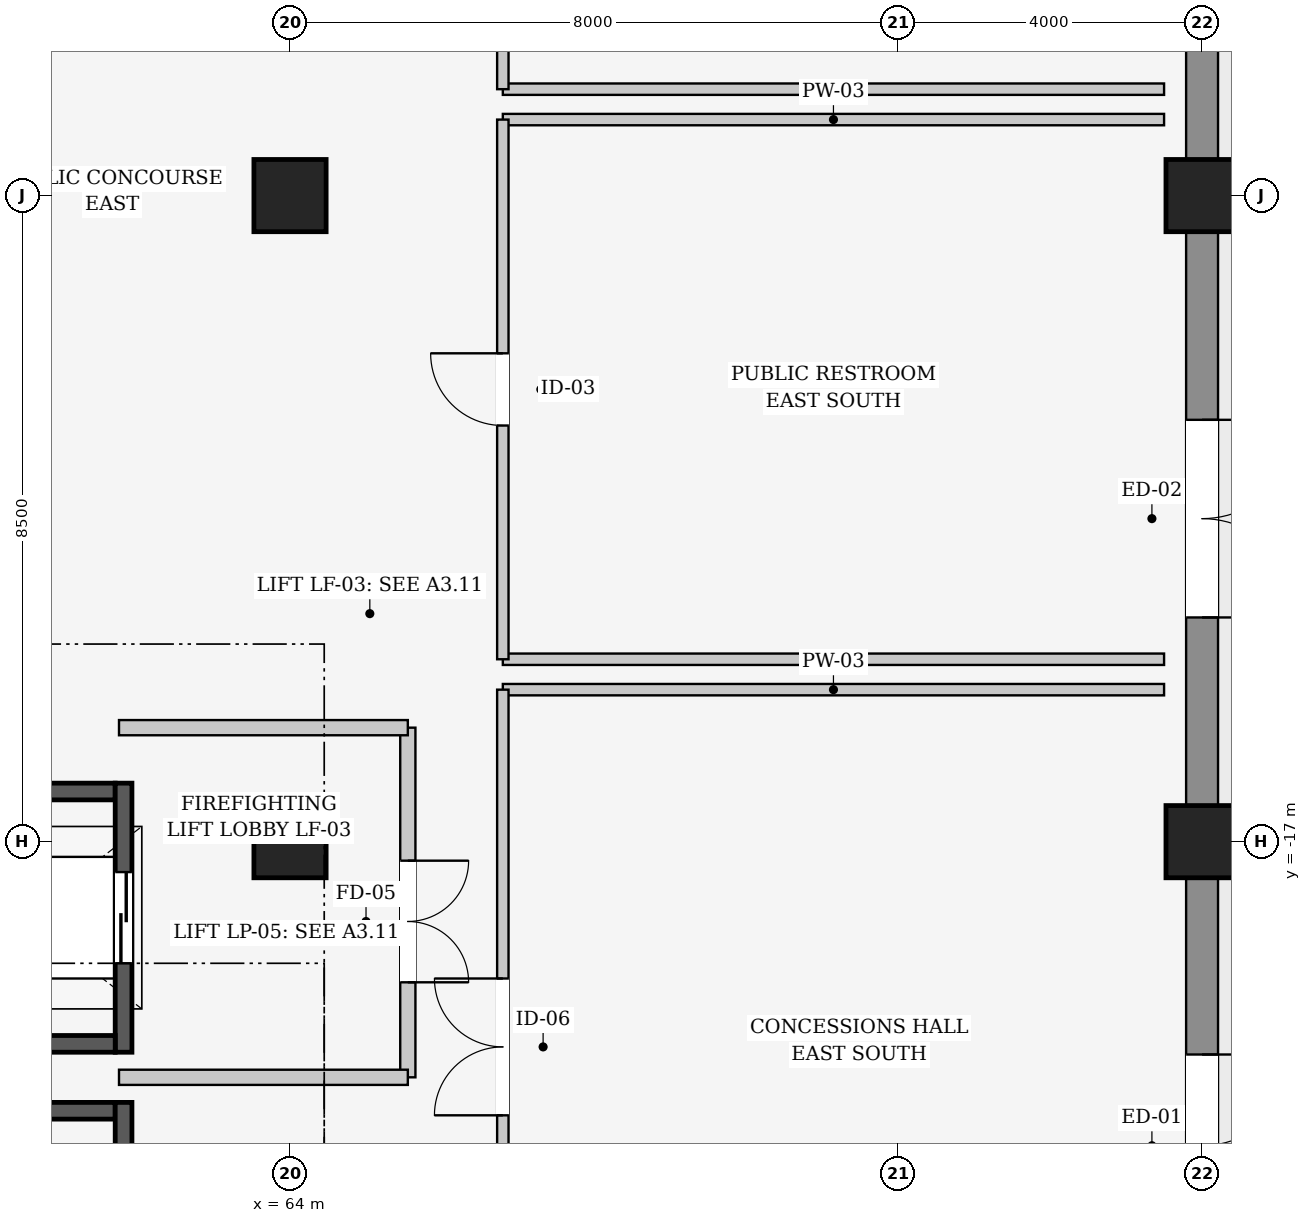
"""IFC4 building model, lengths in metres.
Left out: names, types, materials, properties, quantities, classifications, styles, units other than length and angle.
Written with IfcOpenShell. Run it as: python <this file> out.ifc"""

import sys

from ifc_helpers import new_model, si_unit, direction, frame, frame_2d, origin, origin_2d, place, context, subcontext, project, spatial, rectangle, extrude, element, fill, save


model = new_model("IFC4")
c1 = context("Model", 3, precision=1e-05, world=origin(), true_north=direction((0.0, 1.0)))
c2 = subcontext(c1, "Body", "Model", "MODEL_VIEW")
j1 = project(units=[si_unit("LENGTHUNIT", "METRE"), si_unit("PLANEANGLEUNIT", "RADIAN")], contexts=[c1])
p1 = place(None, origin())
s1 = spatial("IfcSite", under=j1, at=p1, CompositionType="ELEMENT")
p2 = place(p1, origin())
s2 = spatial("IfcBuilding", under=s1, at=p2, CompositionType="ELEMENT")
p3 = place(p2, origin())
s3 = spatial("IfcBuildingStorey", under=s2, at=p3, CompositionType="ELEMENT", Elevation=0.0)
for number, where, z_axis, x_axis in (
    (1, (64.0, -17.0, 0.0), (0.0, 0.0, 1.0), (1.0, 0.0, 0.0)),
    (2, (64.0, -8.5, 0.0), (0.0, 0.0, 1.0), (1.0, 0.0, 0.0)),
    (3, (76.0, -17.0, 0.0), (0.0, 0.0, 1.0), (1.0, 0.0, 0.0)),
    (4, (76.0, -8.5, 0.0), (0.0, 0.0, 1.0), (1.0, 0.0, 0.0)),
):
    element("IfcColumn", number, at=place(p3, frame(where, z_axis=z_axis, x_axis=x_axis)), inside=s3, PredefinedType="COLUMN", context=c2, shape_type="SweptSolid", body=[
        extrude(rectangle(XDim=0.95, YDim=0.95, at=origin_2d()), origin(), (0.0, 0.0, 1.0), 6.0),
    ])
p4 = place(p3, frame((76.0, -17.457, 0.0), z_axis=(0.0, 0.0, 1.0), x_axis=(0.0, -1.0, 0.0)))
e5 = element("IfcWall", 5, at=p4, inside=s3, PredefinedType="SOLIDWALL", context=c2, shape_type="SweptSolid", body=[
    extrude(rectangle(XDim=7.086, YDim=0.42, at=frame_2d((3.543, 0.0))), origin(), (0.0, 0.0, 1.0), 4.74),
])
p5 = place(p4, frame((2.343, 0.0, 0.0)))
e6 = element("IfcOpeningElement", 6, at=p5, cuts=e5, PredefinedType="OPENING", context=c2, shape_type="SweptSolid", body=[
    extrude(rectangle(XDim=2.4, YDim=3.0, at=frame_2d((1.2, 1.5))), frame((0.0, 0.22, 0.0), z_axis=(0.0, -1.0, 0.0), x_axis=(1.0, 0.0, 0.0)), (0.0, 0.0, 1.0), 0.44),
])
p6 = place(p3, frame((76.0, -8.957, 0.0), z_axis=(0.0, 0.0, 1.0), x_axis=(0.0, -1.0, 0.0)))
e7 = element("IfcWall", 7, at=p6, inside=s3, PredefinedType="SOLIDWALL", context=c2, shape_type="SweptSolid", body=[
    extrude(rectangle(XDim=7.586, YDim=0.42, at=frame_2d((3.793, 0.0))), origin(), (0.0, 0.0, 1.0), 4.74),
])
p7 = place(p6, frame((2.493, 0.0, 0.0)))
e8 = element("IfcOpeningElement", 8, at=p7, cuts=e7, PredefinedType="OPENING", context=c2, shape_type="SweptSolid", body=[
    extrude(rectangle(XDim=2.6, YDim=3.0, at=frame_2d((1.3, 1.5))), frame((0.0, 0.22, 0.0), z_axis=(0.0, -1.0, 0.0), x_axis=(1.0, 0.0, 0.0)), (0.0, 0.0, 1.0), 0.44),
])
p8 = place(p3, frame((76.0, -0.457, 0.0), z_axis=(0.0, 0.0, 1.0), x_axis=(0.0, -1.0, 0.0)))
e9 = element("IfcWall", 9, at=p8, inside=s3, PredefinedType="SOLIDWALL", context=c2, shape_type="SweptSolid", body=[
    extrude(rectangle(XDim=7.586, YDim=0.42, at=frame_2d((3.793, 0.0))), origin(), (0.0, 0.0, 1.0), 4.74),
])
p9 = place(p8, frame((2.393, 0.0, 0.0)))
e10 = element("IfcOpeningElement", 10, at=p9, cuts=e9, PredefinedType="OPENING", context=c2, shape_type="SweptSolid", body=[
    extrude(rectangle(XDim=2.8, YDim=3.2, at=frame_2d((1.4, 1.6))), frame((0.0, 0.22, 0.0), z_axis=(0.0, -1.0, 0.0), x_axis=(1.0, 0.0, 0.0)), (0.0, 0.0, 1.0), 0.44),
])
p10 = place(p3, frame((59.3, -16.34, 0.0), z_axis=(0.0, 0.0, 1.0), x_axis=(1.0, 0.0, 0.0)))
e11 = element("IfcWall", 11, at=p10, inside=s3, PredefinedType="SHEAR", context=c2, shape_type="SweptSolid", body=[
    extrude(rectangle(XDim=2.4, YDim=0.22, at=frame_2d((1.2, 0.0))), origin(), (0.0, 0.0, 1.0), 6.0),
])
p11 = place(p3, frame((61.81, -16.23, 0.0), z_axis=(0.0, 0.0, 1.0), x_axis=(0.0, -1.0, 0.0)))
e12 = element("IfcWall", 12, at=p11, inside=s3, PredefinedType="SHEAR", context=c2, shape_type="SweptSolid", body=[
    extrude(rectangle(XDim=3.54, YDim=0.22, at=frame_2d((1.77, 0.0))), origin(), (0.0, 0.0, 1.0), 6.0),
])
p12 = place(p11, frame((1.17, 0.0, 0.0)))
e13 = element("IfcOpeningElement", 13, at=p12, cuts=e12, PredefinedType="OPENING", context=c2, shape_type="SweptSolid", body=[
    extrude(rectangle(XDim=1.2, YDim=2.2, at=frame_2d((0.6, 1.1))), frame((0.0, 0.12, 0.0), z_axis=(0.0, -1.0, 0.0), x_axis=(1.0, 0.0, 0.0)), (0.0, 0.0, 1.0), 0.24),
])
for number, where, z_axis, x_axis in (
    (14, (61.7, -19.66, 0.0), (0.0, 0.0, 1.0), (-1.0, 0.0, 0.0)),
    (15, (59.3, -20.54, 0.0), (0.0, 0.0, 1.0), (1.0, 0.0, 0.0)),
):
    element("IfcWall", number, at=place(p3, frame(where, z_axis=z_axis, x_axis=x_axis)), inside=s3, PredefinedType="SHEAR", context=c2, shape_type="SweptSolid", body=[
        extrude(rectangle(XDim=2.4, YDim=0.22, at=frame_2d((1.2, 0.0))), origin(), (0.0, 0.0, 1.0), 6.0),
    ])
p13 = place(p3, frame((61.81, -20.43, 0.0), z_axis=(0.0, 0.0, 1.0), x_axis=(0.0, -1.0, 0.0)))
e16 = element("IfcWall", 16, at=p13, inside=s3, PredefinedType="SHEAR", context=c2, shape_type="SweptSolid", body=[
    extrude(rectangle(XDim=3.54, YDim=0.22, at=frame_2d((1.77, 0.0))), origin(), (0.0, 0.0, 1.0), 6.0),
])
p14 = place(p13, frame((1.22, 0.0, 0.0)))
e17 = element("IfcOpeningElement", 17, at=p14, cuts=e16, PredefinedType="OPENING", context=c2, shape_type="SweptSolid", body=[
    extrude(rectangle(XDim=1.1, YDim=2.2, at=frame_2d((0.55, 1.1))), frame((0.0, 0.12, 0.0), z_axis=(0.0, -1.0, 0.0), x_axis=(1.0, 0.0, 0.0)), (0.0, 0.0, 1.0), 0.24),
])
p15 = place(p3, frame((65.55, -15.5, 0.0), z_axis=(0.0, 0.0, 1.0), x_axis=(0.0, -1.0, 0.0)))
e18 = element("IfcWall", 18, at=p15, inside=s3, PredefinedType="PARTITIONING", context=c2, shape_type="SweptSolid", body=[
    extrude(rectangle(XDim=4.6, YDim=0.2, at=frame_2d((2.3, 0.0))), origin(), (0.0, 0.0, 1.0), 4.725),
])
p16 = place(p15, frame((1.75, 0.0, 0.0)))
e19 = element("IfcOpeningElement", 19, at=p16, cuts=e18, PredefinedType="OPENING", context=c2, shape_type="SweptSolid", body=[
    extrude(rectangle(XDim=1.6, YDim=2.2, at=frame_2d((0.8, 1.1))), frame((0.0, 0.11, 0.0), z_axis=(0.0, -1.0, 0.0), x_axis=(1.0, 0.0, 0.0)), (0.0, 0.0, 1.0), 0.22),
])
for number, where, z_axis, x_axis in (
    (20, (61.75, -15.5, 0.0), (0.0, 0.0, 1.0), (1.0, 0.0, 0.0)),
    (21, (65.55, -20.1, 0.0), (0.0, 0.0, 1.0), (-1.0, 0.0, 0.0)),
):
    element("IfcWall", number, at=place(p3, frame(where, z_axis=z_axis, x_axis=x_axis)), inside=s3, PredefinedType="PARTITIONING", context=c2, shape_type="SweptSolid", body=[
        extrude(rectangle(XDim=3.8, YDim=0.2, at=frame_2d((1.9, 0.0))), origin(), (0.0, 0.0, 1.0), 5.025),
    ])
p17 = place(p3, frame((66.8, -15.0, 0.0), z_axis=(0.0, 0.0, 1.0), x_axis=(1.0, 0.0, 0.0)))
e22 = element("IfcWall", 22, at=p17, inside=s3, PredefinedType="PARTITIONING", context=c2, shape_type="SweptSolid", body=[
    extrude(rectangle(XDim=8.7, YDim=0.15, at=frame_2d((4.35, 0.0))), origin(), (0.0, 0.0, 1.0), 5.64),
])
p18 = place(p3, frame((66.8, -24.4, 0.0), z_axis=(0.0, 0.0, 1.0), x_axis=(0.0, 1.0, 0.0)))
e23 = element("IfcWall", 23, at=p18, inside=s3, PredefinedType="PARTITIONING", context=c2, shape_type="SweptSolid", body=[
    extrude(rectangle(XDim=9.4, YDim=0.15, at=frame_2d((4.7, 0.0))), origin(), (0.0, 0.0, 1.0), 4.725),
])
p19 = place(p18, frame((3.8, 0.0, 0.0)))
e24 = element("IfcOpeningElement", 24, at=p19, cuts=e23, PredefinedType="OPENING", context=c2, shape_type="SweptSolid", body=[
    extrude(rectangle(XDim=1.8, YDim=2.2, at=frame_2d((0.9, 1.1))), frame((0.0, 0.085, 0.0), z_axis=(0.0, -1.0, 0.0), x_axis=(1.0, 0.0, 0.0)), (0.0, 0.0, 1.0), 0.17),
])
for number, where, z_axis, x_axis in (
    (25, (66.8, -7.5, 0.0), (0.0, 0.0, 1.0), (1.0, 0.0, 0.0)),
    (26, (75.5, -14.6, 0.0), (0.0, 0.0, 1.0), (-1.0, 0.0, 0.0)),
):
    element("IfcWall", number, at=place(p3, frame(where, z_axis=z_axis, x_axis=x_axis)), inside=s3, PredefinedType="PARTITIONING", context=c2, shape_type="SweptSolid", body=[
        extrude(rectangle(XDim=8.7, YDim=0.15, at=frame_2d((4.35, 0.0))), origin(), (0.0, 0.0, 1.0), 5.64),
    ])
p20 = place(p3, frame((66.8, -14.6, 0.0), z_axis=(0.0, 0.0, 1.0), x_axis=(0.0, 1.0, 0.0)))
e27 = element("IfcWall", 27, at=p20, inside=s3, PredefinedType="PARTITIONING", context=c2, shape_type="SweptSolid", body=[
    extrude(rectangle(XDim=7.1, YDim=0.15, at=frame_2d((3.55, 0.0))), origin(), (0.0, 0.0, 1.0), 4.725),
])
p21 = place(p20, frame((3.075, 0.0, 0.0)))
e28 = element("IfcOpeningElement", 28, at=p21, cuts=e27, PredefinedType="OPENING", context=c2, shape_type="SweptSolid", body=[
    extrude(rectangle(XDim=0.95, YDim=2.15, at=frame_2d((0.475, 1.075))), frame((0.0, 0.085, 0.0), z_axis=(0.0, -1.0, 0.0), x_axis=(1.0, 0.0, 0.0)), (0.0, 0.0, 1.0), 0.17),
])
p22 = place(p3, frame((75.5, -7.1, 0.0), z_axis=(0.0, 0.0, 1.0), x_axis=(-1.0, 0.0, 0.0)))
e29 = element("IfcWall", 29, at=p22, inside=s3, PredefinedType="PARTITIONING", context=c2, shape_type="SweptSolid", body=[
    extrude(rectangle(XDim=8.7, YDim=0.15, at=frame_2d((4.35, 0.0))), origin(), (0.0, 0.0, 1.0), 5.64),
])
p23 = place(p3, frame((66.8, -7.1, 0.0), z_axis=(0.0, 0.0, 1.0), x_axis=(0.0, 1.0, 0.0)))
e30 = element("IfcWall", 30, at=p23, inside=s3, PredefinedType="PARTITIONING", context=c2, shape_type="SweptSolid", body=[
    extrude(rectangle(XDim=3.9, YDim=0.15, at=frame_2d((1.95, 0.0))), origin(), (0.0, 0.0, 1.0), 5.32),
])
p24 = place(p23, frame((1.475, 0.0, 0.0)))
e31 = element("IfcOpeningElement", 31, at=p24, cuts=e30, PredefinedType="OPENING", context=c2, shape_type="SweptSolid", body=[
    extrude(rectangle(XDim=0.95, YDim=2.15, at=frame_2d((0.475, 1.075))), frame((0.0, 0.085, 0.0), z_axis=(0.0, -1.0, 0.0), x_axis=(1.0, 0.0, 0.0)), (0.0, 0.0, 1.0), 0.17),
])
p25 = place(p5, origin())
e32 = element("IfcDoor", 32, at=p25, inside=s3, OperationType="DOUBLE_DOOR_SINGLE_SWING", PredefinedType="DOOR", context=c2, shape_type="SweptSolid", body=[
    extrude(rectangle(XDim=2.4, YDim=3.0, at=frame_2d((1.2, 1.5))), frame((0.0, 0.025, 0.0), z_axis=(0.0, -1.0, 0.0), x_axis=(1.0, 0.0, 0.0)), (0.0, 0.0, 1.0), 0.05),
])
fill(e6, e32)
p26 = place(p7, origin())
e33 = element("IfcDoor", 33, at=p26, inside=s3, OperationType="DOUBLE_DOOR_SINGLE_SWING", PredefinedType="DOOR", context=c2, shape_type="SweptSolid", body=[
    extrude(rectangle(XDim=2.6, YDim=3.0, at=frame_2d((1.3, 1.5))), frame((0.0, 0.025, 0.0), z_axis=(0.0, -1.0, 0.0), x_axis=(1.0, 0.0, 0.0)), (0.0, 0.0, 1.0), 0.05),
])
fill(e8, e33)
p27 = place(p12, origin())
e34 = element("IfcDoor", 34, at=p27, inside=s3, OperationType="SLIDING_TO_LEFT", PredefinedType="DOOR", context=c2, shape_type="SweptSolid", body=[
    extrude(rectangle(XDim=1.2, YDim=2.2, at=frame_2d((0.6, 1.1))), frame((0.0, 0.025, 0.0), z_axis=(0.0, -1.0, 0.0), x_axis=(1.0, 0.0, 0.0)), (0.0, 0.0, 1.0), 0.05),
])
fill(e13, e34)
p28 = place(p16, origin())
e35 = element("IfcDoor", 35, at=p28, inside=s3, OperationType="DOUBLE_DOOR_SINGLE_SWING", PredefinedType="DOOR", context=c2, shape_type="SweptSolid", body=[
    extrude(rectangle(XDim=1.6, YDim=2.2, at=frame_2d((0.8, 1.1))), frame((0.0, 0.025, 0.0), z_axis=(0.0, -1.0, 0.0), x_axis=(1.0, 0.0, 0.0)), (0.0, 0.0, 1.0), 0.05),
])
fill(e19, e35)
p29 = place(p19, origin())
e36 = element("IfcDoor", 36, at=p29, inside=s3, OperationType="DOUBLE_DOOR_SINGLE_SWING", PredefinedType="DOOR", context=c2, shape_type="SweptSolid", body=[
    extrude(rectangle(XDim=1.8, YDim=2.2, at=frame_2d((0.9, 1.1))), frame((0.0, 0.025, 0.0), z_axis=(0.0, -1.0, 0.0), x_axis=(1.0, 0.0, 0.0)), (0.0, 0.0, 1.0), 0.05),
])
fill(e24, e36)
p30 = place(p21, origin())
e37 = element("IfcDoor", 37, at=p30, inside=s3, OperationType="SINGLE_SWING_RIGHT", PredefinedType="DOOR", context=c2, shape_type="SweptSolid", body=[
    extrude(rectangle(XDim=0.95, YDim=2.15, at=frame_2d((0.475, 1.075))), frame((0.0, 0.025, 0.0), z_axis=(0.0, -1.0, 0.0), x_axis=(1.0, 0.0, 0.0)), (0.0, 0.0, 1.0), 0.05),
])
fill(e28, e37)
save(model, sys.argv[1])
